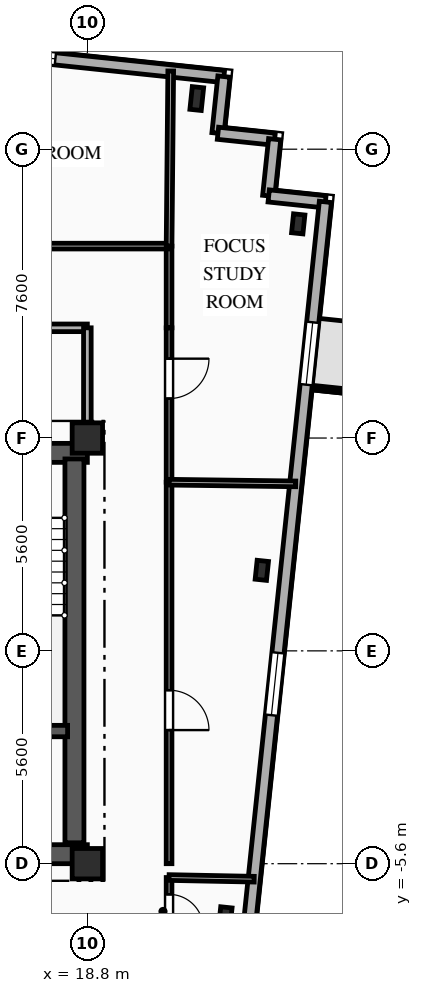
"""IFC4 building model, lengths in metres.
Left out: names, types, materials, properties, quantities, classifications, styles, units other than length and angle.
Written with IfcOpenShell. Run it as: python <this file> out.ifc"""

import sys

from ifc_helpers import new_model, si_unit, direction, frame, frame_2d, origin, origin_2d, place, context, subcontext, project, spatial, rectangle, i_section, extrude, element, fill, save


model = new_model("IFC4")
c1 = context("Model", 3, precision=1e-05, world=origin(), true_north=direction((0.0, 1.0)))
c2 = subcontext(c1, "Body", "Model", "MODEL_VIEW")
j1 = project(units=[si_unit("LENGTHUNIT", "METRE"), si_unit("PLANEANGLEUNIT", "RADIAN")], contexts=[c1])
p1 = place(None, origin())
s1 = spatial("IfcSite", under=j1, at=p1, CompositionType="ELEMENT")
p2 = place(p1, origin())
s2 = spatial("IfcBuilding", under=s1, at=p2, CompositionType="ELEMENT")
p3 = place(p2, frame((0.0, 0.0, 209.8)))
s3 = spatial("IfcBuildingStorey", under=s2, at=p3, CompositionType="ELEMENT", Elevation=209.8)
for number, where, z_axis, x_axis in (
    (1, (18.8, -5.6, 0.0), (0.0, 0.0, 1.0), (1.0, 0.0, 0.0)),
    (2, (18.8, 5.6, 0.0), (0.0, 0.0, 1.0), (1.0, 0.0, 0.0)),
):
    element("IfcColumn", number, at=place(p3, frame(where, z_axis=z_axis, x_axis=x_axis)), inside=s3, PredefinedType="COLUMN", context=c2, shape_type="SweptSolid", body=[
        extrude(rectangle(XDim=0.8, YDim=0.8, at=origin_2d()), origin(), (0.0, 0.0, 1.0), 3.35),
    ])
p4 = place(p3, frame((21.679, 14.532, 0.0), z_axis=(0.0, 0.0, 1.0), x_axis=(0.994521895368, -0.104528463268, 0.0)))
e3 = element("IfcColumn", 3, at=p4, inside=s3, PredefinedType="COLUMN", context=c2, shape_type="SweptSolid", body=[
    extrude(i_section(OverallWidth=0.3, OverallDepth=0.6, WebThickness=0.015, FlangeThickness=0.03, FilletRadius=0.027, at=origin_2d()), origin(), (0.0, 0.0, 1.0), 3.35),
])
for number, where, z_axis, x_axis in (
    (4, (22.433, -6.998, 0.0), (0.0, 0.0, 1.0), (0.995, -0.105, 0.0)),
    (5, (23.391, 2.119, 0.0), (0.0, 0.0, 1.0), (0.995, -0.105, 0.0)),
    (6, (24.349, 11.235, 0.0), (0.0, 0.0, 1.0), (0.995, -0.105, 0.0)),
):
    element("IfcColumn", number, at=place(p3, frame(where, z_axis=z_axis, x_axis=x_axis)), inside=s3, PredefinedType="COLUMN", context=c2, shape_type="SweptSolid", body=[
        extrude(i_section(OverallWidth=0.3, OverallDepth=0.5, WebThickness=0.014, FlangeThickness=0.028, FilletRadius=0.027, at=origin_2d()), origin(), (0.0, 0.0, 1.0), 3.35),
    ])
p5 = place(p3, frame((-23.156, 19.898, 0.0), z_axis=(0.0, 0.0, 1.0), x_axis=(0.994522001802, -0.104527450613, 0.0)))
e7 = element("IfcWall", 7, at=p5, inside=s3, PredefinedType="SOLIDWALL", context=c2, shape_type="SweptSolid", body=[
    extrude(rectangle(XDim=45.8, YDim=0.32, at=frame_2d((22.9, 0.0))), origin(), (0.0, 0.0, 1.0), 3.04),
])
p6 = place(p5, frame((6.021, 0.0, 0.85)))
e8 = element("IfcOpeningElement", 8, at=p6, cuts=e7, PredefinedType="OPENING", context=c2, shape_type="SweptSolid", body=[
    extrude(rectangle(XDim=1.65, YDim=1.85, at=frame_2d((0.825, 0.925))), frame((0.0, 0.17, 0.0), z_axis=(0.0, -1.0, 0.0), x_axis=(1.0, 0.0, 0.0)), (0.0, 0.0, 1.0), 0.34),
])
p7 = place(p5, frame((15.935, 0.0, 0.85)))
e9 = element("IfcOpeningElement", 9, at=p7, cuts=e7, PredefinedType="OPENING", context=c2, shape_type="SweptSolid", body=[
    extrude(rectangle(XDim=1.6, YDim=1.85, at=frame_2d((0.8, 0.925))), frame((0.0, 0.17, 0.0), z_axis=(0.0, -1.0, 0.0), x_axis=(1.0, 0.0, 0.0)), (0.0, 0.0, 1.0), 0.34),
])
p8 = place(p5, frame((22.881, 0.0, 0.85)))
e10 = element("IfcOpeningElement", 10, at=p8, cuts=e7, PredefinedType="OPENING", context=c2, shape_type="SweptSolid", body=[
    extrude(rectangle(XDim=2.2, YDim=1.85, at=frame_2d((1.1, 0.925))), frame((0.0, 0.17, 0.0), z_axis=(0.0, -1.0, 0.0), x_axis=(1.0, 0.0, 0.0)), (0.0, 0.0, 1.0), 0.34),
])
p9 = place(p5, frame((31.288, 0.0, 0.85)))
e11 = element("IfcOpeningElement", 11, at=p9, cuts=e7, PredefinedType="OPENING", context=c2, shape_type="SweptSolid", body=[
    extrude(rectangle(XDim=2.2, YDim=1.85, at=frame_2d((1.1, 0.925))), frame((0.0, 0.17, 0.0), z_axis=(0.0, -1.0, 0.0), x_axis=(1.0, 0.0, 0.0)), (0.0, 0.0, 1.0), 0.34),
])
p10 = place(p5, frame((39.69, 0.0, 0.85)))
e12 = element("IfcOpeningElement", 12, at=p10, cuts=e7, PredefinedType="OPENING", context=c2, shape_type="SweptSolid", body=[
    extrude(rectangle(XDim=1.65, YDim=1.85, at=frame_2d((0.825, 0.925))), frame((0.0, 0.17, 0.0), z_axis=(0.0, -1.0, 0.0), x_axis=(1.0, 0.0, 0.0)), (0.0, 0.0, 1.0), 0.34),
])
p11 = place(p3, frame((22.393, 15.111, 0.0), z_axis=(0.0, 0.0, 1.0), x_axis=(-0.104481464157, -0.994526834051, 0.0)))
e13 = element("IfcWall", 13, at=p11, inside=s3, PredefinedType="SOLIDWALL", context=c2, shape_type="SweptSolid", body=[
    extrude(rectangle(XDim=1.5, YDim=0.32, at=frame_2d((0.75, 0.0))), origin(), (0.0, 0.0, 1.0), 3.04),
])
for number, where, z_axis, x_axis in (
    (14, (22.237, 13.619, 0.0), (0.0, 0.0, 1.0), (0.995, -0.104, 0.0)),
    (15, (23.728, 13.462, 0.0), (0.0, 0.0, 1.0), (-0.104, -0.995, 0.0)),
    (16, (23.572, 11.971, 0.0), (0.0, 0.0, 1.0), (0.995, -0.105, 0.0)),
):
    element("IfcWall", number, at=place(p3, frame(where, z_axis=z_axis, x_axis=x_axis)), inside=s3, PredefinedType="SOLIDWALL", context=c2, shape_type="SweptSolid", body=[
        extrude(rectangle(XDim=1.5, YDim=0.32, at=frame_2d((0.75, 0.0))), origin(), (0.0, 0.0, 1.0), 3.04),
    ])
p12 = place(p3, frame((25.063, 11.814, 0.0), z_axis=(0.0, 0.0, 1.0), x_axis=(-0.104523275986, -0.99452244056, 0.0)))
e17 = element("IfcWall", 17, at=p12, inside=s3, PredefinedType="SOLIDWALL", context=c2, shape_type="SweptSolid", body=[
    extrude(rectangle(XDim=28.8, YDim=0.32, at=frame_2d((14.4, 0.0))), origin(), (0.0, 0.0, 1.0), 3.04),
])
p13 = place(p12, frame((3.186, 0.0, 0.85)))
e18 = element("IfcOpeningElement", 18, at=p13, cuts=e17, PredefinedType="OPENING", context=c2, shape_type="SweptSolid", body=[
    extrude(rectangle(XDim=1.65, YDim=1.85, at=frame_2d((0.825, 0.925))), frame((0.0, 0.17, 0.0), z_axis=(0.0, -1.0, 0.0), x_axis=(1.0, 0.0, 0.0)), (0.0, 0.0, 1.0), 0.34),
])
p14 = place(p12, frame((11.93, 0.0, 0.85)))
e19 = element("IfcOpeningElement", 19, at=p14, cuts=e17, PredefinedType="OPENING", context=c2, shape_type="SweptSolid", body=[
    extrude(rectangle(XDim=1.65, YDim=1.85, at=frame_2d((0.825, 0.925))), frame((0.0, 0.17, 0.0), z_axis=(0.0, -1.0, 0.0), x_axis=(1.0, 0.0, 0.0)), (0.0, 0.0, 1.0), 0.34),
])
p15 = place(p12, frame((22.359, 0.0, 0.85)))
e20 = element("IfcOpeningElement", 20, at=p15, cuts=e17, PredefinedType="OPENING", context=c2, shape_type="SweptSolid", body=[
    extrude(rectangle(XDim=1.65, YDim=1.85, at=frame_2d((0.825, 0.925))), frame((0.0, 0.17, 0.0), z_axis=(0.0, -1.0, 0.0), x_axis=(1.0, 0.0, 0.0)), (0.0, 0.0, 1.0), 0.34),
])
p16 = place(p3, frame((9.2, 5.21, 0.0), z_axis=(0.0, 0.0, 1.0), x_axis=(1.0, 0.0, 0.0)))
e21 = element("IfcWall", 21, at=p16, inside=s3, PredefinedType="SHEAR", context=c2, shape_type="SweptSolid", body=[
    extrude(rectangle(XDim=9.6, YDim=0.5, at=frame_2d((4.8, 0.0))), origin(), (0.0, 0.0, 1.0), 3.04),
])
p17 = place(p16, frame((6.95, 0.0, 0.0)))
e22 = element("IfcOpeningElement", 22, at=p17, cuts=e21, PredefinedType="OPENING", context=c2, shape_type="SweptSolid", body=[
    extrude(rectangle(XDim=1.1, YDim=2.15, at=frame_2d((0.55, 1.075))), frame((0.0, 0.26, 0.0), z_axis=(0.0, -1.0, 0.0), x_axis=(1.0, 0.0, 0.0)), (0.0, 0.0, 1.0), 0.52),
])
p18 = place(p16, frame((3.775, 0.0, 0.0)))
e23 = element("IfcOpeningElement", 23, at=p18, cuts=e21, PredefinedType="OPENING", context=c2, shape_type="SweptSolid", body=[
    extrude(rectangle(XDim=1.05, YDim=2.1, at=frame_2d((0.525, 1.05))), frame((0.0, 0.26, 0.0), z_axis=(0.0, -1.0, 0.0), x_axis=(1.0, 0.0, 0.0)), (0.0, 0.0, 1.0), 0.52),
])
p19 = place(p3, frame((9.2, -5.35, 0.0), z_axis=(0.0, 0.0, 1.0), x_axis=(1.0, 0.0, 0.0)))
e24 = element("IfcWall", 24, at=p19, inside=s3, PredefinedType="SHEAR", context=c2, shape_type="SweptSolid", body=[
    extrude(rectangle(XDim=9.6, YDim=0.5, at=frame_2d((4.8, 0.0))), origin(), (0.0, 0.0, 1.0), 3.04),
])
p20 = place(p19, frame((7.65, 0.0, 0.0)))
e25 = element("IfcOpeningElement", 25, at=p20, cuts=e24, PredefinedType="OPENING", context=c2, shape_type="SweptSolid", body=[
    extrude(rectangle(XDim=0.9, YDim=2.1, at=frame_2d((0.45, 1.05))), frame((0.0, 0.26, 0.0), z_axis=(0.0, -1.0, 0.0), x_axis=(1.0, 0.0, 0.0)), (0.0, 0.0, 1.0), 0.52),
])
p21 = place(p3, frame((18.46, -5.05, 0.0), z_axis=(0.0, 0.0, 1.0), x_axis=(0.0, 1.0, 0.0)))
e26 = element("IfcWall", 26, at=p21, inside=s3, PredefinedType="SHEAR", context=c2, shape_type="SweptSolid", body=[
    extrude(rectangle(XDim=10.1, YDim=0.5, at=frame_2d((5.05, 0.0))), origin(), (0.0, 0.0, 1.0), 3.04),
])
p22 = place(p3, frame((15.1, -2.11, 0.0), z_axis=(0.0, 0.0, 1.0), x_axis=(1.0, 0.0, 0.0)))
e27 = element("IfcWall", 27, at=p22, inside=s3, PredefinedType="SHEAR", context=c2, shape_type="SweptSolid", body=[
    extrude(rectangle(XDim=3.18, YDim=0.3, at=frame_2d((1.59, 0.0))), origin(), (0.0, 0.0, 1.0), 3.04),
])
p23 = place(p3, frame((18.8, 8.5, 0.0), z_axis=(0.0, 0.0, 1.0), x_axis=(-1.0, 0.0, 0.0)))
e28 = element("IfcWall", 28, at=p23, inside=s3, PredefinedType="PARTITIONING", context=c2, shape_type="SweptSolid", body=[
    extrude(rectangle(XDim=6.8, YDim=0.2, at=frame_2d((3.4, 0.0))), origin(), (0.0, 0.0, 1.0), 3.04),
])
p24 = place(p23, frame((3.985, 0.0, 0.0)))
e29 = element("IfcOpeningElement", 29, at=p24, cuts=e28, PredefinedType="OPENING", context=c2, shape_type="SweptSolid", body=[
    extrude(rectangle(XDim=1.1, YDim=2.15, at=frame_2d((0.55, 1.075))), frame((0.0, 0.11, 0.0), z_axis=(0.0, -1.0, 0.0), x_axis=(1.0, 0.0, 0.0)), (0.0, 0.0, 1.0), 0.22),
])
p25 = place(p3, frame((18.8, 5.6, 0.0), z_axis=(0.0, 0.0, 1.0), x_axis=(0.0, 1.0, 0.0)))
e30 = element("IfcWall", 30, at=p25, inside=s3, PredefinedType="PARTITIONING", context=c2, shape_type="SweptSolid", body=[
    extrude(rectangle(XDim=2.9, YDim=0.2, at=frame_2d((1.45, 0.0))), origin(), (0.0, 0.0, 1.0), 2.665),
])
p26 = place(p3, frame((20.95, 10.65, 0.0), z_axis=(0.0, 0.0, 1.0), x_axis=(0.0, -1.0, 0.0)))
e31 = element("IfcWall", 31, at=p26, inside=s3, PredefinedType="PARTITIONING", context=c2, shape_type="SweptSolid", body=[
    extrude(rectangle(XDim=2.15, YDim=0.15, at=frame_2d((1.075, 0.0))), origin(), (0.0, 0.0, 1.0), 3.04),
])
p27 = place(p3, frame((13.17, 10.65, 0.0), z_axis=(0.0, 0.0, 1.0), x_axis=(1.0, 0.0, 0.0)))
e32 = element("IfcWall", 32, at=p27, inside=s3, PredefinedType="PARTITIONING", context=c2, shape_type="SweptSolid", body=[
    extrude(rectangle(XDim=7.78, YDim=0.15, at=frame_2d((3.89, 0.0))), origin(), (0.0, 0.0, 1.0), 3.04),
])
p28 = place(p27, frame((3.365, 0.0, 0.0)))
e33 = element("IfcOpeningElement", 33, at=p28, cuts=e32, PredefinedType="OPENING", context=c2, shape_type="SweptSolid", body=[
    extrude(rectangle(XDim=1.05, YDim=2.15, at=frame_2d((0.525, 1.075))), frame((0.0, 0.085, 0.0), z_axis=(0.0, -1.0, 0.0), x_axis=(1.0, 0.0, 0.0)), (0.0, 0.0, 1.0), 0.17),
])
p29 = place(p3, frame((20.95, -5.964, 0.0), z_axis=(0.0, 0.0, 1.0), x_axis=(0.0, -1.0, 0.0)))
e34 = element("IfcWall", 34, at=p29, inside=s3, PredefinedType="PARTITIONING", context=c2, shape_type="SweptSolid", body=[
    extrude(rectangle(XDim=1.786, YDim=0.15, at=frame_2d((0.893, 0.0))), origin(), (0.0, 0.0, 1.0), 3.04),
])
p30 = place(p29, frame((0.443, 0.0, 0.0)))
e35 = element("IfcOpeningElement", 35, at=p30, cuts=e34, PredefinedType="OPENING", context=c2, shape_type="SweptSolid", body=[
    extrude(rectangle(XDim=0.9, YDim=2.1, at=frame_2d((0.45, 1.05))), frame((0.0, 0.085, 0.0), z_axis=(0.0, -1.0, 0.0), x_axis=(1.0, 0.0, 0.0)), (0.0, 0.0, 1.0), 0.17),
])
p31 = place(p3, frame((20.95, 4.438, 0.0), z_axis=(0.0, 0.0, 1.0), x_axis=(0.0, -1.0, 0.0)))
e36 = element("IfcWall", 36, at=p31, inside=s3, PredefinedType="PARTITIONING", context=c2, shape_type="SweptSolid", body=[
    extrude(rectangle(XDim=10.038, YDim=0.15, at=frame_2d((5.019, 0.0))), origin(), (0.0, 0.0, 1.0), 2.695),
])
p32 = place(p31, frame((5.472, 0.0, 0.0)))
e37 = element("IfcOpeningElement", 37, at=p32, cuts=e36, PredefinedType="OPENING", context=c2, shape_type="SweptSolid", body=[
    extrude(rectangle(XDim=1.05, YDim=2.15, at=frame_2d((0.525, 1.075))), frame((0.0, 0.085, 0.0), z_axis=(0.0, -1.0, 0.0), x_axis=(1.0, 0.0, 0.0)), (0.0, 0.0, 1.0), 0.17),
])
p33 = place(p3, frame((20.95, 8.5, 0.0), z_axis=(0.0, 0.0, 1.0), x_axis=(0.0, -1.0, 0.0)))
e38 = element("IfcWall", 38, at=p33, inside=s3, PredefinedType="PARTITIONING", context=c2, shape_type="SweptSolid", body=[
    extrude(rectangle(XDim=4.062, YDim=0.15, at=frame_2d((2.031, 0.0))), origin(), (0.0, 0.0, 1.0), 3.04),
])
p34 = place(p33, frame((0.812, 0.0, 0.0)))
e39 = element("IfcOpeningElement", 39, at=p34, cuts=e38, PredefinedType="OPENING", context=c2, shape_type="SweptSolid", body=[
    extrude(rectangle(XDim=1.05, YDim=2.15, at=frame_2d((0.525, 1.075))), frame((0.0, 0.085, 0.0), z_axis=(0.0, -1.0, 0.0), x_axis=(1.0, 0.0, 0.0)), (0.0, 0.0, 1.0), 0.17),
])
p35 = place(p3, frame((20.95, -5.964, 0.0), z_axis=(0.0, 0.0, 1.0), x_axis=(0.999809784752, -0.019503700029, 0.0)))
e40 = element("IfcWall", 40, at=p35, inside=s3, PredefinedType="PARTITIONING", context=c2, shape_type="SweptSolid", body=[
    extrude(rectangle(XDim=2.241, YDim=0.15, at=frame_2d((1.12, 0.0))), origin(), (0.0, 0.0, 1.0), 3.04),
])
p36 = place(p3, frame((20.95, 4.438, 0.0), z_axis=(0.0, 0.0, 1.0), x_axis=(0.999913116238, -0.013181804667, 0.0)))
e41 = element("IfcWall", 41, at=p36, inside=s3, PredefinedType="PARTITIONING", context=c2, shape_type="SweptSolid", body=[
    extrude(rectangle(XDim=3.334, YDim=0.15, at=frame_2d((1.667, 0.0))), origin(), (0.0, 0.0, 1.0), 3.04),
])
p37 = place(p3, frame((20.95, 10.65, 0.0), z_axis=(0.0, 0.0, 1.0), x_axis=(0.009535990233, 0.999954531411, 0.0)))
e42 = element("IfcWall", 42, at=p37, inside=s3, PredefinedType="PARTITIONING", context=c2, shape_type="SweptSolid", body=[
    extrude(rectangle(XDim=4.608, YDim=0.15, at=frame_2d((2.304, 0.0))), origin(), (0.0, 0.0, 1.0), 2.665),
])
p38 = place(p10, origin())
e43 = element("IfcWindow", 43, at=p38, inside=s3, PartitioningType="SINGLE_PANEL", PredefinedType="WINDOW", context=c2, shape_type="SweptSolid", body=[
    extrude(rectangle(XDim=1.65, YDim=1.85, at=frame_2d((0.825, 0.925))), frame((0.0, 0.03, 0.0), z_axis=(0.0, -1.0, 0.0), x_axis=(1.0, 0.0, 0.0)), (0.0, 0.0, 1.0), 0.06),
])
fill(e12, e43)
p39 = place(p13, origin())
e44 = element("IfcWindow", 44, at=p39, inside=s3, PartitioningType="SINGLE_PANEL", PredefinedType="WINDOW", context=c2, shape_type="SweptSolid", body=[
    extrude(rectangle(XDim=1.65, YDim=1.85, at=frame_2d((0.825, 0.925))), frame((0.0, 0.03, 0.0), z_axis=(0.0, -1.0, 0.0), x_axis=(1.0, 0.0, 0.0)), (0.0, 0.0, 1.0), 0.06),
])
fill(e18, e44)
p40 = place(p14, origin())
e45 = element("IfcWindow", 45, at=p40, inside=s3, PartitioningType="SINGLE_PANEL", PredefinedType="WINDOW", context=c2, shape_type="SweptSolid", body=[
    extrude(rectangle(XDim=1.65, YDim=1.85, at=frame_2d((0.825, 0.925))), frame((0.0, 0.03, 0.0), z_axis=(0.0, -1.0, 0.0), x_axis=(1.0, 0.0, 0.0)), (0.0, 0.0, 1.0), 0.06),
])
fill(e19, e45)
p41 = place(p30, origin())
e46 = element("IfcDoor", 46, at=p41, inside=s3, OperationType="SINGLE_SWING_RIGHT", PredefinedType="DOOR", context=c2, shape_type="SweptSolid", body=[
    extrude(rectangle(XDim=0.9, YDim=2.1, at=frame_2d((0.45, 1.05))), frame((0.0, 0.025, 0.0), z_axis=(0.0, -1.0, 0.0), x_axis=(1.0, 0.0, 0.0)), (0.0, 0.0, 1.0), 0.05),
])
fill(e35, e46)
p42 = place(p32, origin())
e47 = element("IfcDoor", 47, at=p42, inside=s3, OperationType="SINGLE_SWING_RIGHT", PredefinedType="DOOR", context=c2, shape_type="SweptSolid", body=[
    extrude(rectangle(XDim=1.05, YDim=2.15, at=frame_2d((0.525, 1.075))), frame((0.0, 0.025, 0.0), z_axis=(0.0, -1.0, 0.0), x_axis=(1.0, 0.0, 0.0)), (0.0, 0.0, 1.0), 0.05),
])
fill(e37, e47)
p43 = place(p34, origin())
e48 = element("IfcDoor", 48, at=p43, inside=s3, OperationType="SINGLE_SWING_LEFT", PredefinedType="DOOR", context=c2, shape_type="SweptSolid", body=[
    extrude(rectangle(XDim=1.05, YDim=2.15, at=frame_2d((0.525, 1.075))), frame((0.0, 0.025, 0.0), z_axis=(0.0, -1.0, 0.0), x_axis=(1.0, 0.0, 0.0)), (0.0, 0.0, 1.0), 0.05),
])
fill(e39, e48)
save(model, sys.argv[1])
